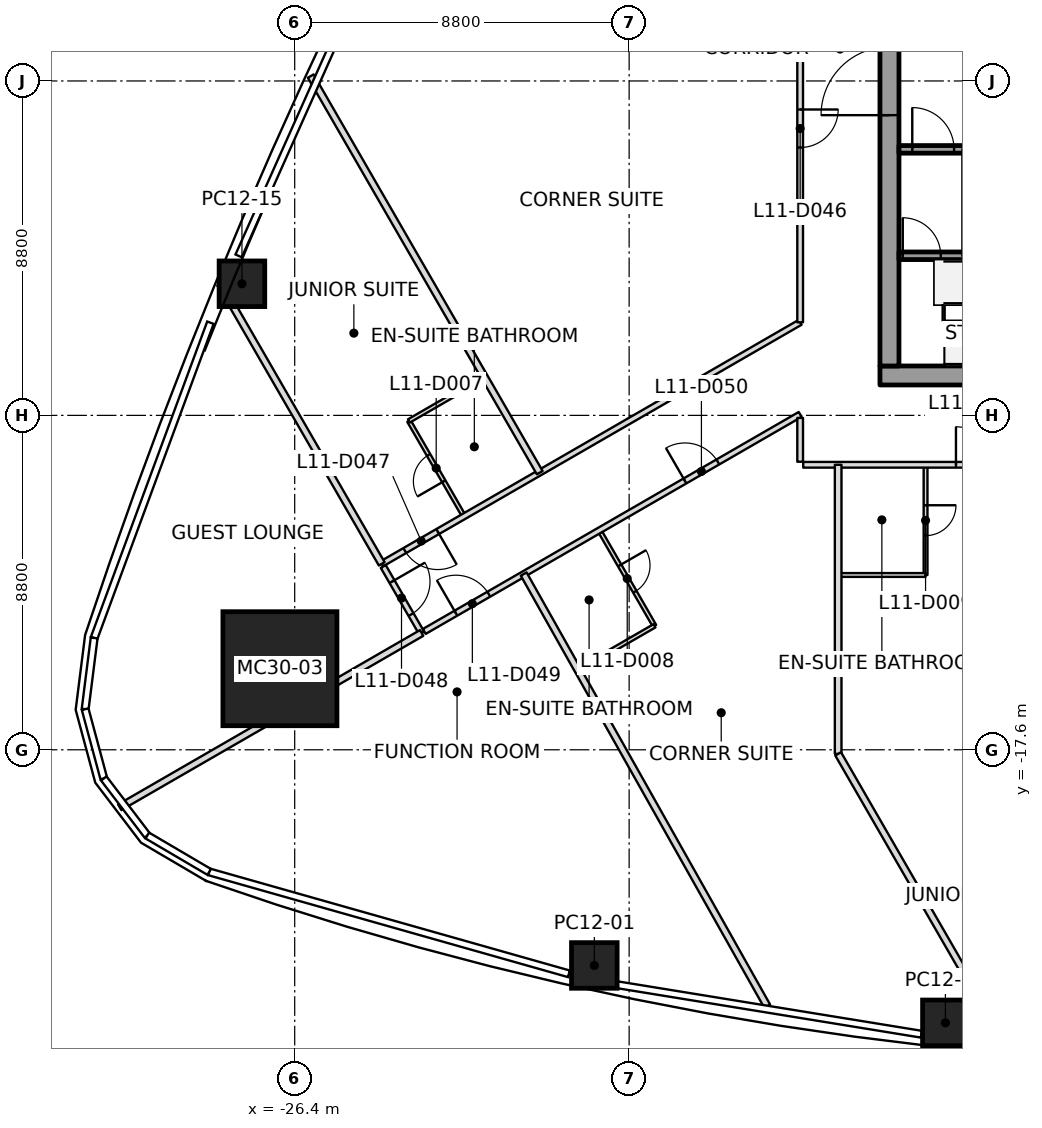
"""IFC4 building model, lengths in metres.
Left out: names, types, materials, properties, quantities, classifications, styles, units other than length and angle.
Written with IfcOpenShell. Run it as: python <this file> out.ifc"""

import sys

from ifc_helpers import new_model, si_unit, direction, frame, frame_2d, origin, origin_2d, place, context, subcontext, project, spatial, rectangle, extrude, clip, halfspace, element, fill, save


model = new_model("IFC4")
c1 = context("Model", 3, precision=1e-05, world=origin(), true_north=direction((0.0, 1.0)))
c2 = subcontext(c1, "Body", "Model", "MODEL_VIEW")
j1 = project(units=[si_unit("LENGTHUNIT", "METRE"), si_unit("PLANEANGLEUNIT", "RADIAN")], contexts=[c1])
p1 = place(None, origin())
s1 = spatial("IfcSite", under=j1, at=p1, CompositionType="ELEMENT")
p2 = place(p1, origin())
s2 = spatial("IfcBuilding", under=s1, at=p2, CompositionType="ELEMENT")
p3 = place(p2, frame((0.0, 0.0, 62.8)))
s3 = spatial("IfcBuildingStorey", under=s2, at=p3, CompositionType="ELEMENT", Elevation=62.8)
p4 = place(p3, frame((-26.789, -15.467, 0.0), z_axis=(0.030531992032, 0.017607001884, 0.999378702468), x_axis=(0.999533790055, -0.000537827582, -0.03052725469)))
e1 = element("IfcColumn", 1, at=p4, inside=s3, PredefinedType="COLUMN", context=c2, shape_type="SweptSolid", body=[
    extrude(rectangle(XDim=3.0, YDim=3.0, at=origin_2d()), origin(), (0.0, 0.0, 1.0), 3.702),
])
p5 = place(p3, frame((-18.516, -23.275, 0.0), z_axis=(0.019035359056, 0.17391691533, 0.98457633613), x_axis=(-0.976521539024, 0.214578146302, -0.019023747061)))
e2 = element("IfcColumn", 2, at=p5, inside=s3, PredefinedType="COLUMN", context=c2, shape_type="SweptSolid", body=[
    clip(clip(extrude(rectangle(XDim=1.2, YDim=1.2, at=origin_2d()), origin(), (0.0, 0.0, 1.0), 3.758), halfspace(frame((0.0, 0.0, 0.0)), True)), halfspace(frame((0.0, 0.0, 3.752)), False)),
])
p6 = place(p3, frame((-9.278, -24.785, 0.0), z_axis=(0.009454937322, 0.223059337629, 0.97475901435), x_axis=(0.988869315433, -0.146836694661, 0.024009625055)))
e3 = element("IfcColumn", 3, at=p6, inside=s3, PredefinedType="COLUMN", context=c2, shape_type="SweptSolid", body=[
    clip(extrude(rectangle(XDim=1.2, YDim=1.2, at=origin_2d()), origin(), (0.0, 0.0, 1.0), 3.796), halfspace(frame((0.0, 0.0, 3.789)), False)),
])
p7 = place(p3, frame((-27.788, -5.337, 0.0), z_axis=(0.019460655113, 0.011016709844, 0.999749926235), x_axis=(0.381541837416, 0.924183792164, -0.017610922819)))
e4 = element("IfcColumn", 4, at=p7, inside=s3, PredefinedType="COLUMN", context=c2, shape_type="SweptSolid", body=[
    extrude(rectangle(XDim=1.2, YDim=1.2, at=origin_2d()), origin(), (0.0, 0.0, 1.0), 3.701),
])
p8 = place(p3, frame((-11.0, -7.75, 0.0), z_axis=(0.0, 0.0, 1.0), x_axis=(1.0, 0.0, 0.0)))
e5 = element("IfcWall", 5, at=p8, inside=s3, PredefinedType="SHEAR", context=c2, shape_type="SweptSolid", body=[
    extrude(rectangle(XDim=22.0, YDim=0.5, at=frame_2d((11.0, 0.0))), origin(), (0.0, 0.0, 1.0), 3.7),
])
p9 = place(p8, frame((10.45, 0.0, 0.0)))
e6 = element("IfcOpeningElement", 6, at=p9, cuts=e5, PredefinedType="OPENING", context=c2, shape_type="SweptSolid", body=[
    extrude(rectangle(XDim=1.1, YDim=2.1, at=frame_2d((0.55, 1.05))), frame((0.0, 0.25, 0.0), z_axis=(0.0, -1.0, 0.0), x_axis=(1.0, 0.0, 0.0)), (0.0, 0.0, 1.0), 0.5),
])
p10 = place(p3, frame((-10.75, -7.5, 0.0), z_axis=(0.0, 0.0, 1.0), x_axis=(0.0, 1.0, 0.0)))
e7 = element("IfcWall", 7, at=p10, inside=s3, PredefinedType="SHEAR", context=c2, shape_type="SweptSolid", body=[
    extrude(rectangle(XDim=15.0, YDim=0.5, at=frame_2d((7.5, 0.0))), origin(), (0.0, 0.0, 1.0), 3.7),
])
p11 = place(p10, frame((6.6, 0.0, 0.0)))
e8 = element("IfcOpeningElement", 8, at=p11, cuts=e7, PredefinedType="OPENING", context=c2, shape_type="SweptSolid", body=[
    extrude(rectangle(XDim=1.8, YDim=2.1, at=frame_2d((0.9, 1.05))), frame((0.0, 0.25, 0.0), z_axis=(0.0, -1.0, 0.0), x_axis=(1.0, 0.0, 0.0)), (0.0, 0.0, 1.0), 0.5),
])
p12 = place(p3, frame((-10.5, -4.6, 0.0), z_axis=(0.0, 0.0, 1.0), x_axis=(1.0, 0.0, 0.0)))
e9 = element("IfcWall", 9, at=p12, inside=s3, PredefinedType="SOLIDWALL", context=c2, shape_type="SweptSolid", body=[
    extrude(rectangle(XDim=1.8, YDim=0.2, at=frame_2d((0.9, 0.0))), origin(), (0.0, 0.0, 1.0), 3.55),
])
p13 = place(p12, frame((0.1, 0.0, 0.0)))
e10 = element("IfcOpeningElement", 10, at=p13, cuts=e9, PredefinedType="OPENING", context=c2, shape_type="SweptSolid", body=[
    extrude(rectangle(XDim=1.0, YDim=2.1, at=frame_2d((0.5, 1.05))), frame((0.0, 0.1, 0.0), z_axis=(0.0, -1.0, 0.0), x_axis=(1.0, 0.0, 0.0)), (0.0, 0.0, 1.0), 0.2),
])
p14 = place(p3, frame((-10.5, -1.8, 0.0), z_axis=(0.0, 0.0, 1.0), x_axis=(1.0, 0.0, 0.0)))
e11 = element("IfcWall", 11, at=p14, inside=s3, PredefinedType="SOLIDWALL", context=c2, shape_type="SweptSolid", body=[
    extrude(rectangle(XDim=1.8, YDim=0.2, at=frame_2d((0.9, 0.0))), origin(), (0.0, 0.0, 1.0), 3.55),
])
p15 = place(p14, frame((0.35, 0.0, 0.0)))
e12 = element("IfcOpeningElement", 12, at=p15, cuts=e11, PredefinedType="OPENING", context=c2, shape_type="SweptSolid", body=[
    extrude(rectangle(XDim=1.1, YDim=2.1, at=frame_2d((0.55, 1.05))), frame((0.0, 0.1, 0.0), z_axis=(0.0, -1.0, 0.0), x_axis=(1.0, 0.0, 0.0)), (0.0, 0.0, 1.0), 0.2),
])
p16 = place(p3, frame((-23.06, -14.526, 0.0), z_axis=(0.0, 0.0, 1.0), x_axis=(-0.866023364538, -0.500003532061, 0.0)))
e13 = element("IfcWall", 13, at=p16, inside=s3, PredefinedType="PARTITIONING", context=c2, shape_type="SweptSolid", body=[
    extrude(rectangle(XDim=9.173, YDim=0.175, at=frame_2d((4.586, 0.0))), origin(), (0.0, 0.0, 1.0), 2.934),
])
p17 = place(p3, frame((-24.11, -12.707, 0.0), z_axis=(0.0, 0.0, 1.0), x_axis=(-0.500004040168, 0.86602307118, 0.0)))
e14 = element("IfcWall", 14, at=p17, inside=s3, PredefinedType="PARTITIONING", context=c2, shape_type="SweptSolid", body=[
    extrude(rectangle(XDim=8.506, YDim=0.175, at=frame_2d((4.253, 0.0))), origin(), (0.0, 0.0, 1.0), 2.934),
])
p18 = place(p3, frame((-19.953, -10.307, 0.0), z_axis=(0.0, 0.0, 1.0), x_axis=(-0.500011246013, 0.866018910798, 0.0)))
e15 = element("IfcWall", 15, at=p18, inside=s3, PredefinedType="PARTITIONING", context=c2, shape_type="SweptSolid", body=[
    extrude(rectangle(XDim=12.05, YDim=0.175, at=frame_2d((6.025, 0.0))), origin(), (0.0, 0.0, 1.0), 2.934),
])
p19 = place(p3, frame((-13.967, -24.346, 0.0), z_axis=(0.0, 0.0, 1.0), x_axis=(-0.490951118702, 0.871187120569, 0.0)))
e16 = element("IfcWall", 16, at=p19, inside=s3, PredefinedType="PARTITIONING", context=c2, shape_type="SweptSolid", body=[
    extrude(rectangle(XDim=13.052, YDim=0.175, at=frame_2d((6.526, 0.0))), origin(), (0.0, 0.0, 1.0), 2.934),
])
p20 = place(p3, frame((-12.1, -10.1, 0.0), z_axis=(0.0, 0.0, 1.0), x_axis=(0.0, -1.0, 0.0)))
e17 = element("IfcWall", 17, at=p20, inside=s3, PredefinedType="PARTITIONING", context=c2, shape_type="SweptSolid", body=[
    extrude(rectangle(XDim=7.608, YDim=0.175, at=frame_2d((3.804, 0.0))), origin(), (0.0, 0.0, 1.0), 3.15),
])
p21 = place(p3, frame((-12.1, -17.708, 0.0), z_axis=(0.0, 0.0, 1.0), x_axis=(0.500016042471, -0.866016141462, 0.0)))
e18 = element("IfcWall", 18, at=p21, inside=s3, PredefinedType="PARTITIONING", context=c2, shape_type="SweptSolid", body=[
    extrude(rectangle(XDim=8.974, YDim=0.175, at=frame_2d((4.487, 0.0))), origin(), (0.0, 0.0, 1.0), 2.934),
])
p22 = place(p3, frame((-13.1, -6.351, 0.0), z_axis=(0.0, 0.0, 1.0), x_axis=(-0.866022163861, -0.50000561167, 0.0)))
e19 = element("IfcWall", 19, at=p22, inside=s3, PredefinedType="PARTITIONING", context=c2, shape_type="SweptSolid", body=[
    extrude(rectangle(XDim=12.713, YDim=0.15, at=frame_2d((6.356, 0.0))), origin(), (0.0, 0.0, 1.0), 2.947),
])
p23 = place(p22, frame((11.013, 0.0, 0.0)))
e20 = element("IfcOpeningElement", 20, at=p23, cuts=e19, PredefinedType="OPENING", context=c2, shape_type="SweptSolid", body=[
    extrude(rectangle(XDim=1.0, YDim=2.1, at=frame_2d((0.5, 1.05))), frame((0.0, 0.075, 0.0), z_axis=(0.0, -1.0, 0.0), x_axis=(1.0, 0.0, 0.0)), (0.0, 0.0, 1.0), 0.15),
])
p24 = place(p3, frame((-24.07, -12.777, 0.0), z_axis=(0.0, 0.0, 1.0), x_axis=(0.499935208997, -0.866062807656, 0.0)))
e21 = element("IfcWall", 21, at=p24, inside=s3, PredefinedType="PARTITIONING", context=c2, shape_type="SweptSolid", body=[
    extrude(rectangle(XDim=2.02, YDim=0.15, at=frame_2d((1.01, 0.0))), origin(), (0.0, 0.0, 1.0), 2.797),
])
p25 = place(p24, frame((0.46, 0.0, 0.0)))
e22 = element("IfcOpeningElement", 22, at=p25, cuts=e21, PredefinedType="OPENING", context=c2, shape_type="SweptSolid", body=[
    extrude(rectangle(XDim=1.0, YDim=2.1, at=frame_2d((0.5, 1.05))), frame((0.0, 0.075, 0.0), z_axis=(0.0, -1.0, 0.0), x_axis=(1.0, 0.0, 0.0)), (0.0, 0.0, 1.0), 0.15),
])
p26 = place(p3, frame((-22.99, -14.486, 0.0), z_axis=(0.0, 0.0, 1.0), x_axis=(0.866025744017, 0.499999410699, 0.0)))
e23 = element("IfcWall", 23, at=p26, inside=s3, PredefinedType="PARTITIONING", context=c2, shape_type="SweptSolid", body=[
    extrude(rectangle(XDim=11.42, YDim=0.15, at=frame_2d((5.71, 0.0))), origin(), (0.0, 0.0, 1.0), 2.797),
])
p27 = place(p26, frame((0.96, 0.0, 0.0)))
e24 = element("IfcOpeningElement", 24, at=p27, cuts=e23, PredefinedType="OPENING", context=c2, shape_type="SweptSolid", body=[
    extrude(rectangle(XDim=1.0, YDim=2.1, at=frame_2d((0.5, 1.05))), frame((0.0, 0.075, 0.0), z_axis=(0.0, -1.0, 0.0), x_axis=(1.0, 0.0, 0.0)), (0.0, 0.0, 1.0), 0.15),
])
p28 = place(p26, frame((7.92, 0.0, 0.0)))
e25 = element("IfcOpeningElement", 25, at=p28, cuts=e23, PredefinedType="OPENING", context=c2, shape_type="SweptSolid", body=[
    extrude(rectangle(XDim=1.0, YDim=2.1, at=frame_2d((0.5, 1.05))), frame((0.0, 0.075, 0.0), z_axis=(0.0, -1.0, 0.0), x_axis=(1.0, 0.0, 0.0)), (0.0, 0.0, 1.0), 0.15),
])
p29 = place(p3, frame((-13.1, -8.867, 0.0), z_axis=(0.0, 0.0, 1.0), x_axis=(0.0, -1.0, 0.0)))
e26 = element("IfcWall", 26, at=p29, inside=s3, PredefinedType="PARTITIONING", context=c2, shape_type="SweptSolid", body=[
    extrude(rectangle(XDim=1.153, YDim=0.15, at=frame_2d((0.576, 0.0))), origin(), (0.0, 0.0, 1.0), 2.797),
])
p30 = place(p3, frame((-13.1, 10.02, 0.0), z_axis=(0.0, 0.0, 1.0), x_axis=(0.0, -1.0, 0.0)))
e27 = element("IfcWall", 27, at=p30, inside=s3, PredefinedType="PARTITIONING", context=c2, shape_type="SweptSolid", body=[
    extrude(rectangle(XDim=16.371, YDim=0.15, at=frame_2d((8.186, 0.0))), origin(), (0.0, 0.0, 1.0), 3.017),
])
p31 = place(p30, frame((2.545, 0.0, 0.0)))
e28 = element("IfcOpeningElement", 28, at=p31, cuts=e27, PredefinedType="OPENING", context=c2, shape_type="SweptSolid", body=[
    extrude(rectangle(XDim=1.0, YDim=2.1, at=frame_2d((0.5, 1.05))), frame((0.0, 0.075, 0.0), z_axis=(0.0, -1.0, 0.0), x_axis=(1.0, 0.0, 0.0)), (0.0, 0.0, 1.0), 0.15),
])
p32 = place(p30, frame((10.771, 0.0, 0.0)))
e29 = element("IfcOpeningElement", 29, at=p32, cuts=e27, PredefinedType="OPENING", context=c2, shape_type="SweptSolid", body=[
    extrude(rectangle(XDim=1.0, YDim=2.1, at=frame_2d((0.5, 1.05))), frame((0.0, 0.075, 0.0), z_axis=(0.0, -1.0, 0.0), x_axis=(1.0, 0.0, 0.0)), (0.0, 0.0, 1.0), 0.15),
])
p33 = place(p3, frame((-13.02, -10.1, 0.0), z_axis=(0.0, 0.0, 1.0), x_axis=(1.0, 0.0, 0.0)))
e30 = element("IfcWall", 30, at=p33, inside=s3, PredefinedType="PARTITIONING", context=c2, shape_type="SweptSolid", body=[
    extrude(rectangle(XDim=26.04, YDim=0.15, at=frame_2d((13.02, 0.0))), origin(), (0.0, 0.0, 1.0), 2.947),
])
p34 = place(p33, frame((4.02, 0.0, 0.0)))
e31 = element("IfcOpeningElement", 31, at=p34, cuts=e30, PredefinedType="OPENING", context=c2, shape_type="SweptSolid", body=[
    extrude(rectangle(XDim=1.0, YDim=2.1, at=frame_2d((0.5, 1.05))), frame((0.0, 0.075, 0.0), z_axis=(0.0, -1.0, 0.0), x_axis=(1.0, 0.0, 0.0)), (0.0, 0.0, 1.0), 0.15),
])
p35 = place(p33, frame((7.02, 0.0, 0.0)))
e32 = element("IfcOpeningElement", 32, at=p35, cuts=e30, PredefinedType="OPENING", context=c2, shape_type="SweptSolid", body=[
    extrude(rectangle(XDim=1.0, YDim=2.1, at=frame_2d((0.5, 1.05))), frame((0.0, 0.075, 0.0), z_axis=(0.0, -1.0, 0.0), x_axis=(1.0, 0.0, 0.0)), (0.0, 0.0, 1.0), 0.15),
])
p36 = place(p33, frame((12.12, 0.0, 0.0)))
e33 = element("IfcOpeningElement", 33, at=p36, cuts=e30, PredefinedType="OPENING", context=c2, shape_type="SweptSolid", body=[
    extrude(rectangle(XDim=1.0, YDim=2.1, at=frame_2d((0.5, 1.05))), frame((0.0, 0.075, 0.0), z_axis=(0.0, -1.0, 0.0), x_axis=(1.0, 0.0, 0.0)), (0.0, 0.0, 1.0), 0.15),
])
p37 = place(p33, frame((16.62, 0.0, 0.0)))
e34 = element("IfcOpeningElement", 34, at=p37, cuts=e30, PredefinedType="OPENING", context=c2, shape_type="SweptSolid", body=[
    extrude(rectangle(XDim=1.0, YDim=2.1, at=frame_2d((0.5, 1.05))), frame((0.0, 0.075, 0.0), z_axis=(0.0, -1.0, 0.0), x_axis=(1.0, 0.0, 0.0)), (0.0, 0.0, 1.0), 0.15),
])
p38 = place(p33, frame((19.62, 0.0, 0.0)))
e35 = element("IfcOpeningElement", 35, at=p38, cuts=e30, PredefinedType="OPENING", context=c2, shape_type="SweptSolid", body=[
    extrude(rectangle(XDim=1.0, YDim=2.1, at=frame_2d((0.5, 1.05))), frame((0.0, 0.075, 0.0), z_axis=(0.0, -1.0, 0.0), x_axis=(1.0, 0.0, 0.0)), (0.0, 0.0, 1.0), 0.15),
])
p39 = place(p3, frame((-21.96, -11.431, 0.0), z_axis=(0.0, 0.0, 1.0), x_axis=(-0.499936001555, 0.866062350151, 0.0)))
e36 = element("IfcWall", 36, at=p39, inside=s3, PredefinedType="PARTITIONING", context=c2, shape_type="SweptSolid", body=[
    extrude(rectangle(XDim=2.87, YDim=0.1, at=frame_2d((1.435, 0.0))), origin(), (0.0, 0.0, 1.0), 3.15),
])
p40 = place(p39, frame((1.035, 0.0, 0.0)))
e37 = element("IfcOpeningElement", 37, at=p40, cuts=e36, PredefinedType="OPENING", context=c2, shape_type="SweptSolid", body=[
    extrude(rectangle(XDim=0.8, YDim=2.1, at=frame_2d((0.4, 1.05))), frame((0.0, 0.05, 0.0), z_axis=(0.0, -1.0, 0.0), x_axis=(1.0, 0.0, 0.0)), (0.0, 0.0, 1.0), 0.1),
])
p41 = place(p3, frame((-23.395, -8.946, 0.0), z_axis=(0.0, 0.0, 1.0), x_axis=(0.866017224141, 0.500014167291, 0.0)))
e38 = element("IfcWall", 38, at=p41, inside=s3, PredefinedType="PARTITIONING", context=c2, shape_type="SweptSolid", body=[
    extrude(rectangle(XDim=2.27, YDim=0.1, at=frame_2d((1.135, 0.0))), origin(), (0.0, 0.0, 1.0), 3.15),
])
p42 = place(p3, frame((-18.368, -11.852, 0.0), z_axis=(0.0, 0.0, 1.0), x_axis=(0.500036638401, -0.866004249561, 0.0)))
e39 = element("IfcWall", 39, at=p42, inside=s3, PredefinedType="PARTITIONING", context=c2, shape_type="SweptSolid", body=[
    extrude(rectangle(XDim=2.87, YDim=0.1, at=frame_2d((1.435, 0.0))), origin(), (0.0, 0.0, 1.0), 3.15),
])
p43 = place(p42, frame((1.035, 0.0, 0.0)))
e40 = element("IfcOpeningElement", 40, at=p43, cuts=e39, PredefinedType="OPENING", context=c2, shape_type="SweptSolid", body=[
    extrude(rectangle(XDim=0.8, YDim=2.1, at=frame_2d((0.4, 1.05))), frame((0.0, 0.05, 0.0), z_axis=(0.0, -1.0, 0.0), x_axis=(1.0, 0.0, 0.0)), (0.0, 0.0, 1.0), 0.1),
])
p44 = place(p3, frame((-16.933, -14.337, 0.0), z_axis=(0.0, 0.0, 1.0), x_axis=(-0.866017224141, -0.500014167291, 0.0)))
e41 = element("IfcWall", 41, at=p44, inside=s3, PredefinedType="PARTITIONING", context=c2, shape_type="SweptSolid", body=[
    extrude(rectangle(XDim=2.27, YDim=0.1, at=frame_2d((1.135, 0.0))), origin(), (0.0, 0.0, 1.0), 3.15),
])
p45 = place(p3, frame((-9.8, -10.13, 0.0), z_axis=(0.0, 0.0, 1.0), x_axis=(0.0, -1.0, 0.0)))
e42 = element("IfcWall", 42, at=p45, inside=s3, PredefinedType="PARTITIONING", context=c2, shape_type="SweptSolid", body=[
    extrude(rectangle(XDim=2.87, YDim=0.1, at=frame_2d((1.435, 0.0))), origin(), (0.0, 0.0, 1.0), 3.15),
])
p46 = place(p45, frame((1.035, 0.0, 0.0)))
e43 = element("IfcOpeningElement", 43, at=p46, cuts=e42, PredefinedType="OPENING", context=c2, shape_type="SweptSolid", body=[
    extrude(rectangle(XDim=0.8, YDim=2.1, at=frame_2d((0.4, 1.05))), frame((0.0, 0.05, 0.0), z_axis=(0.0, -1.0, 0.0), x_axis=(1.0, 0.0, 0.0)), (0.0, 0.0, 1.0), 0.1),
])
p47 = place(p3, frame((-9.8, -13.0, 0.0), z_axis=(0.0, 0.0, 1.0), x_axis=(-1.0, 0.0, 0.0)))
e44 = element("IfcWall", 44, at=p47, inside=s3, PredefinedType="PARTITIONING", context=c2, shape_type="SweptSolid", body=[
    extrude(rectangle(XDim=2.27, YDim=0.1, at=frame_2d((1.135, 0.0))), origin(), (0.0, 0.0, 1.0), 3.15),
])
p48 = place(p32, origin())
e45 = element("IfcDoor", 45, at=p48, inside=s3, OperationType="SINGLE_SWING_LEFT", PredefinedType="DOOR", context=c2, shape_type="SweptSolid", body=[
    extrude(rectangle(XDim=1.0, YDim=2.1, at=frame_2d((0.5, 1.05))), frame((0.0, 0.025, 0.0), z_axis=(0.0, -1.0, 0.0), x_axis=(1.0, 0.0, 0.0)), (0.0, 0.0, 1.0), 0.05),
])
fill(e29, e45)
p49 = place(p23, origin())
e46 = element("IfcDoor", 46, at=p49, inside=s3, OperationType="SINGLE_SWING_LEFT", PredefinedType="DOOR", context=c2, shape_type="SweptSolid", body=[
    extrude(rectangle(XDim=1.0, YDim=2.1, at=frame_2d((0.5, 1.05))), frame((0.0, 0.025, 0.0), z_axis=(0.0, -1.0, 0.0), x_axis=(1.0, 0.0, 0.0)), (0.0, 0.0, 1.0), 0.05),
])
fill(e20, e46)
p50 = place(p40, origin())
e47 = element("IfcDoor", 47, at=p50, inside=s3, OperationType="SINGLE_SWING_LEFT", PredefinedType="DOOR", context=c2, shape_type="SweptSolid", body=[
    extrude(rectangle(XDim=0.8, YDim=2.1, at=frame_2d((0.4, 1.05))), frame((0.0, 0.025, 0.0), z_axis=(0.0, -1.0, 0.0), x_axis=(1.0, 0.0, 0.0)), (0.0, 0.0, 1.0), 0.05),
])
fill(e37, e47)
p51 = place(p25, origin())
e48 = element("IfcDoor", 48, at=p51, inside=s3, OperationType="SINGLE_SWING_LEFT", PredefinedType="DOOR", context=c2, shape_type="SweptSolid", body=[
    extrude(rectangle(XDim=1.0, YDim=2.1, at=frame_2d((0.5, 1.05))), frame((0.0, 0.025, 0.0), z_axis=(0.0, -1.0, 0.0), x_axis=(1.0, 0.0, 0.0)), (0.0, 0.0, 1.0), 0.05),
])
fill(e22, e48)
p52 = place(p27, origin())
e49 = element("IfcDoor", 49, at=p52, inside=s3, OperationType="SINGLE_SWING_LEFT", PredefinedType="DOOR", context=c2, shape_type="SweptSolid", body=[
    extrude(rectangle(XDim=1.0, YDim=2.1, at=frame_2d((0.5, 1.05))), frame((0.0, 0.025, 0.0), z_axis=(0.0, -1.0, 0.0), x_axis=(1.0, 0.0, 0.0)), (0.0, 0.0, 1.0), 0.05),
])
fill(e24, e49)
p53 = place(p28, origin())
e50 = element("IfcDoor", 50, at=p53, inside=s3, OperationType="SINGLE_SWING_LEFT", PredefinedType="DOOR", context=c2, shape_type="SweptSolid", body=[
    extrude(rectangle(XDim=1.0, YDim=2.1, at=frame_2d((0.5, 1.05))), frame((0.0, 0.025, 0.0), z_axis=(0.0, -1.0, 0.0), x_axis=(1.0, 0.0, 0.0)), (0.0, 0.0, 1.0), 0.05),
])
fill(e25, e50)
p54 = place(p43, origin())
e51 = element("IfcDoor", 51, at=p54, inside=s3, OperationType="SINGLE_SWING_RIGHT", PredefinedType="DOOR", context=c2, shape_type="SweptSolid", body=[
    extrude(rectangle(XDim=0.8, YDim=2.1, at=frame_2d((0.4, 1.05))), frame((0.0, 0.025, 0.0), z_axis=(0.0, -1.0, 0.0), x_axis=(1.0, 0.0, 0.0)), (0.0, 0.0, 1.0), 0.05),
])
fill(e40, e51)
p55 = place(p34, origin())
e52 = element("IfcDoor", 52, at=p55, inside=s3, OperationType="SINGLE_SWING_LEFT", PredefinedType="DOOR", context=c2, shape_type="SweptSolid", body=[
    extrude(rectangle(XDim=1.0, YDim=2.1, at=frame_2d((0.5, 1.05))), frame((0.0, 0.025, 0.0), z_axis=(0.0, -1.0, 0.0), x_axis=(1.0, 0.0, 0.0)), (0.0, 0.0, 1.0), 0.05),
])
fill(e31, e52)
p56 = place(p46, origin())
e53 = element("IfcDoor", 53, at=p56, inside=s3, OperationType="SINGLE_SWING_RIGHT", PredefinedType="DOOR", context=c2, shape_type="SweptSolid", body=[
    extrude(rectangle(XDim=0.8, YDim=2.1, at=frame_2d((0.4, 1.05))), frame((0.0, 0.025, 0.0), z_axis=(0.0, -1.0, 0.0), x_axis=(1.0, 0.0, 0.0)), (0.0, 0.0, 1.0), 0.05),
])
fill(e43, e53)
p57 = place(p15, origin())
e54 = element("IfcDoor", 54, at=p57, inside=s3, OperationType="SINGLE_SWING_LEFT", PredefinedType="DOOR", context=c2, shape_type="SweptSolid", body=[
    extrude(rectangle(XDim=1.1, YDim=2.1, at=frame_2d((0.55, 1.05))), frame((0.0, 0.025, 0.0), z_axis=(0.0, -1.0, 0.0), x_axis=(1.0, 0.0, 0.0)), (0.0, 0.0, 1.0), 0.05),
])
fill(e12, e54)
p58 = place(p13, origin())
e55 = element("IfcDoor", 55, at=p58, inside=s3, OperationType="SINGLE_SWING_LEFT", PredefinedType="DOOR", context=c2, shape_type="SweptSolid", body=[
    extrude(rectangle(XDim=1.0, YDim=2.1, at=frame_2d((0.5, 1.05))), frame((0.0, 0.025, 0.0), z_axis=(0.0, -1.0, 0.0), x_axis=(1.0, 0.0, 0.0)), (0.0, 0.0, 1.0), 0.05),
])
fill(e10, e55)
p59 = place(p11, origin())
e56 = element("IfcDoor", 56, at=p59, inside=s3, OperationType="DOUBLE_DOOR_SINGLE_SWING", PredefinedType="DOOR", context=c2, shape_type="SweptSolid", body=[
    extrude(rectangle(XDim=1.8, YDim=2.1, at=frame_2d((0.9, 1.05))), frame((0.0, 0.025, 0.0), z_axis=(0.0, -1.0, 0.0), x_axis=(1.0, 0.0, 0.0)), (0.0, 0.0, 1.0), 0.05),
])
fill(e8, e56)
save(model, sys.argv[1])
